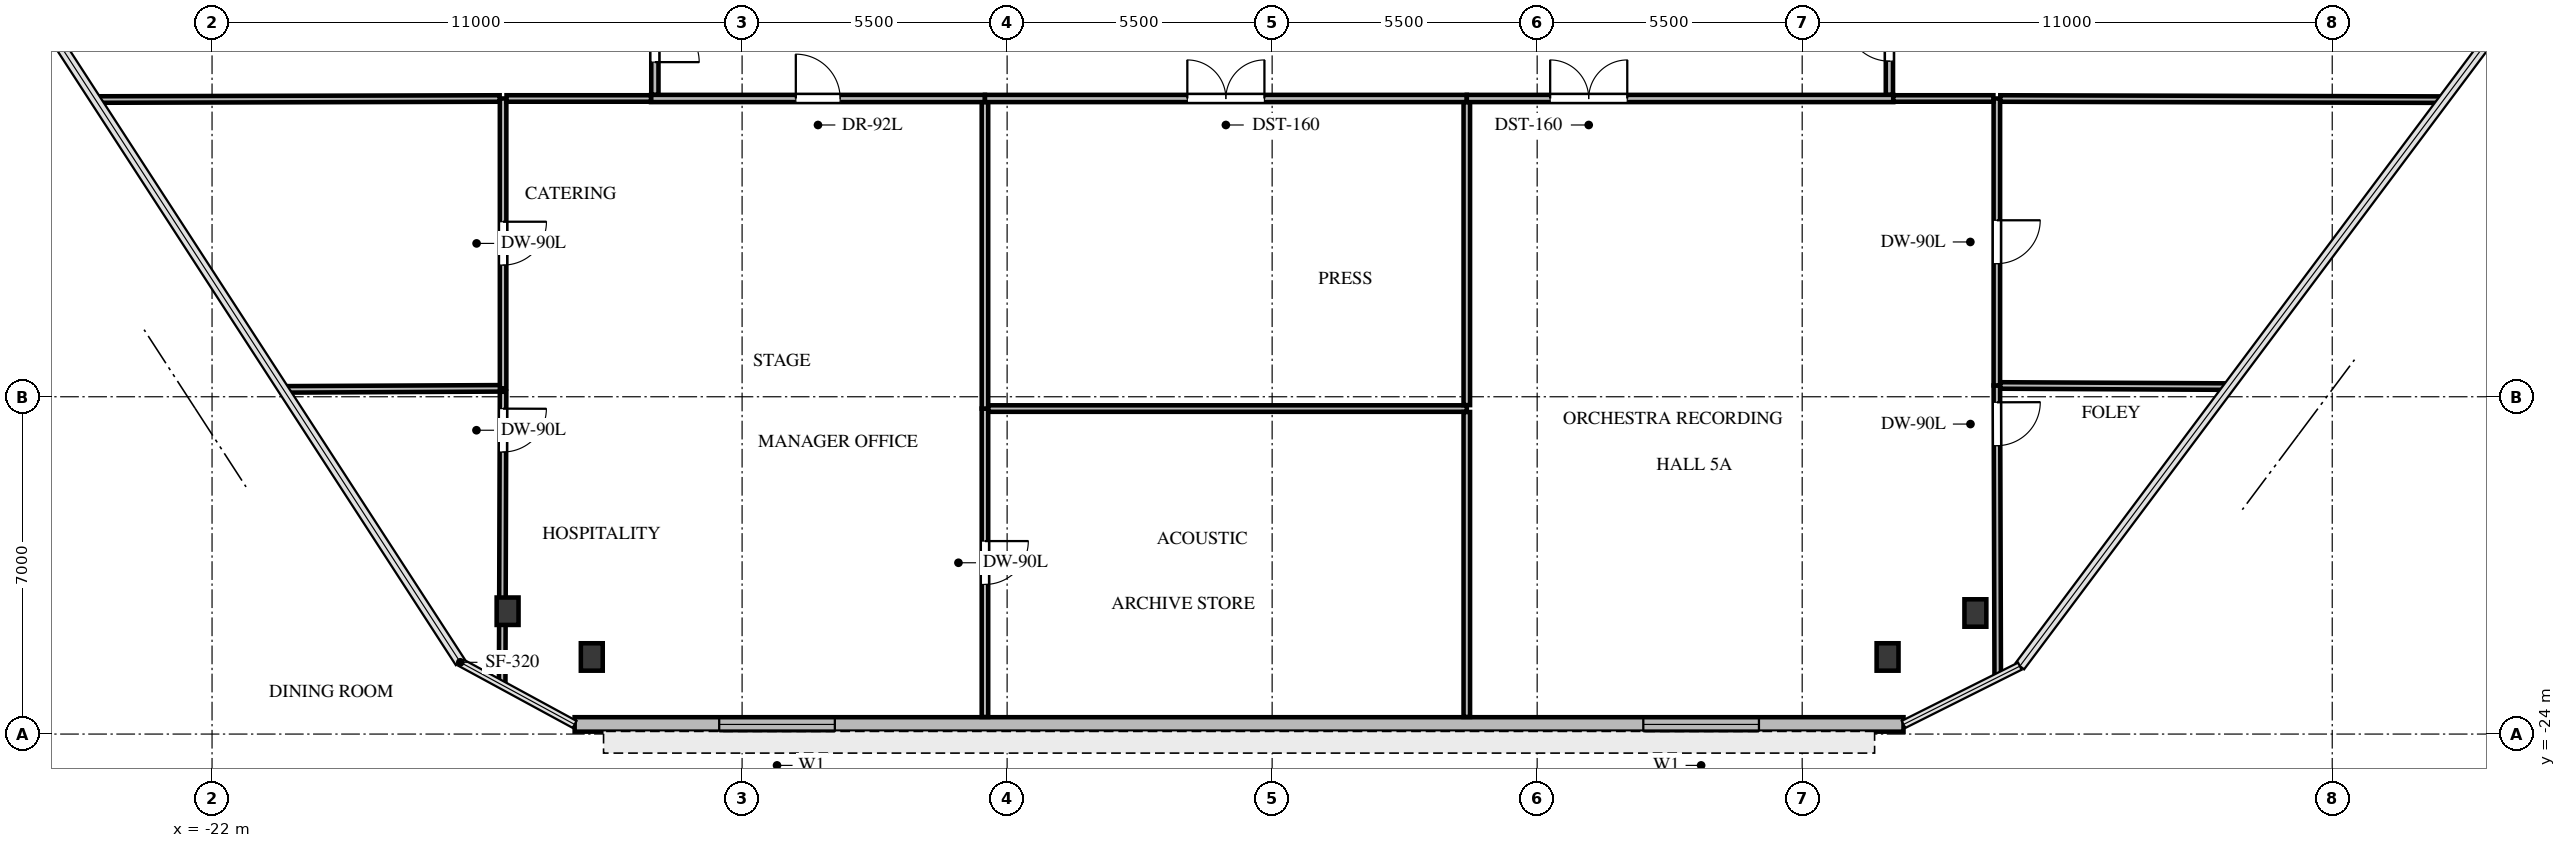
"""IFC4 building model, lengths in metres.
Left out: names, types, materials, properties, quantities, classifications, styles, units other than length and angle.
Written with IfcOpenShell. Run it as: python <this file> out.ifc"""

import sys

from ifc_helpers import new_model, si_unit, direction, frame, frame_2d, origin, origin_2d, place, context, subcontext, project, spatial, rectangle, i_section, extrude, source, transform, mapped, element, fill, save


model = new_model("IFC4")
c1 = context("Model", 3, precision=1e-05, world=origin(), true_north=direction((0.0, 1.0)))
c2 = subcontext(c1, "Body", "Model", "MODEL_VIEW")
j1 = project(units=[si_unit("LENGTHUNIT", "METRE"), si_unit("PLANEANGLEUNIT", "RADIAN")], contexts=[c1])
p1 = place(None, origin())
s1 = spatial("IfcSite", under=j1, at=p1, CompositionType="ELEMENT")
p2 = place(p1, origin())
s2 = spatial("IfcBuilding", under=s1, at=p2, CompositionType="ELEMENT")
p3 = place(p2, frame((0.0, 0.0, 26.8)))
s3 = spatial("IfcBuildingStorey", under=s2, at=p3, CompositionType="ELEMENT", Elevation=26.8)
m1 = source(origin(), c2, "Body", "SweptSolid", [
    extrude(i_section(OverallWidth=0.454, OverallDepth=0.569, WebThickness=0.078, FlangeThickness=0.125, FilletRadius=0.031, at=origin_2d()), origin(), (0.0, 0.0, 1.0), 5.68),
])
for number, where, z_axis, x_axis in (
    (1, (-15.866, -21.451, -0.32), (0.0, 0.0, 1.0), (1.0, 0.0, 0.0)),
    (2, (14.594, -21.488, -0.32), (0.0, 0.0, 1.0), (1.0, 0.0, 0.0)),
    (3, (12.772, -22.4, -0.32), (0.0, 0.0, 1.0), (1.0, 0.0, 0.0)),
    (4, (-14.119, -22.4, -0.32), (0.0, 0.0, 1.0), (1.0, 0.0, 0.0)),
):
    element("IfcColumn", number, at=place(p3, frame(where, z_axis=z_axis, x_axis=x_axis)), inside=s3, PredefinedType="COLUMN", context=c2, shape_type="MappedRepresentation", body=[
        mapped(m1, transform((0.0, 0.0, 0.0), x_axis=(1.0, 0.0, 0.0), y_axis=(0.0, 1.0, 0.0), z_axis=(0.0, 0.0, 1.0), scale=1.0)),
    ])
p4 = place(p3, frame((13.103, -23.8, 0.0), z_axis=(0.0, 0.0, 1.0), x_axis=(-1.0, 0.0, 0.0)))
e5 = element("IfcWall", 5, at=p4, inside=s3, PredefinedType="SOLIDWALL", context=c2, shape_type="SweptSolid", body=[
    extrude(rectangle(XDim=27.578, YDim=0.3, at=frame_2d((13.789, 0.0))), origin(), (0.0, 0.0, 1.0), 5.36),
])
p5 = place(p4, frame((3.0, 0.0, 1.0)))
e6 = element("IfcOpeningElement", 6, at=p5, cuts=e5, PredefinedType="OPENING", context=c2, shape_type="SweptSolid", body=[
    extrude(rectangle(XDim=2.4, YDim=2.1, at=frame_2d((1.2, 1.05))), frame((0.0, 0.16, 0.0), z_axis=(0.0, -1.0, 0.0), x_axis=(1.0, 0.0, 0.0)), (0.0, 0.0, 1.0), 0.32),
])
p6 = place(p4, frame((22.178, 0.0, 1.0)))
e7 = element("IfcOpeningElement", 7, at=p6, cuts=e5, PredefinedType="OPENING", context=c2, shape_type="SweptSolid", body=[
    extrude(rectangle(XDim=2.4, YDim=2.1, at=frame_2d((1.2, 1.05))), frame((0.0, 0.16, 0.0), z_axis=(0.0, -1.0, 0.0), x_axis=(1.0, 0.0, 0.0)), (0.0, 0.0, 1.0), 0.32),
])
p7 = place(p3, frame((-12.89, -10.81, 0.0), z_axis=(0.0, 0.0, 1.0), x_axis=(1.0, 0.0, 0.0)))
e8 = element("IfcWall", 8, at=p7, inside=s3, PredefinedType="PARTITIONING", context=c2, shape_type="SweptSolid", body=[
    extrude(rectangle(XDim=6.93, YDim=0.15, at=frame_2d((3.465, 0.0))), origin(), (0.0, 0.0, 1.0), 3.53),
])
p8 = place(p7, frame((3.005, 0.0, 0.0)))
e9 = element("IfcOpeningElement", 9, at=p8, cuts=e8, PredefinedType="OPENING", context=c2, shape_type="SweptSolid", body=[
    extrude(rectangle(XDim=0.92, YDim=2.1, at=frame_2d((0.46, 1.05))), frame((0.0, 0.085, 0.0), z_axis=(0.0, -1.0, 0.0), x_axis=(1.0, 0.0, 0.0)), (0.0, 0.0, 1.0), 0.17),
])
p9 = place(p3, frame((-5.96, -10.81, 0.0), z_axis=(0.0, 0.0, 1.0), x_axis=(1.0, 0.0, 0.0)))
e10 = element("IfcWall", 10, at=p9, inside=s3, PredefinedType="PARTITIONING", context=c2, shape_type="SweptSolid", body=[
    extrude(rectangle(XDim=10.0, YDim=0.15, at=frame_2d((5.0, 0.0))), origin(), (0.0, 0.0, 1.0), 3.53),
])
p10 = place(p9, frame((4.2, 0.0, 0.0)))
e11 = element("IfcOpeningElement", 11, at=p10, cuts=e10, PredefinedType="OPENING", context=c2, shape_type="SweptSolid", body=[
    extrude(rectangle(XDim=1.6, YDim=2.15, at=frame_2d((0.8, 1.075))), frame((0.0, 0.085, 0.0), z_axis=(0.0, -1.0, 0.0), x_axis=(1.0, 0.0, 0.0)), (0.0, 0.0, 1.0), 0.17),
])
p11 = place(p3, frame((4.04, -10.81, 0.0), z_axis=(0.0, 0.0, 1.0), x_axis=(1.0, 0.0, 0.0)))
e12 = element("IfcWall", 12, at=p11, inside=s3, PredefinedType="PARTITIONING", context=c2, shape_type="SweptSolid", body=[
    extrude(rectangle(XDim=8.85, YDim=0.15, at=frame_2d((4.425, 0.0))), origin(), (0.0, 0.0, 1.0), 3.53),
])
p12 = place(p11, frame((1.73, 0.0, 0.0)))
e13 = element("IfcOpeningElement", 13, at=p12, cuts=e12, PredefinedType="OPENING", context=c2, shape_type="SweptSolid", body=[
    extrude(rectangle(XDim=1.6, YDim=2.15, at=frame_2d((0.8, 1.075))), frame((0.0, 0.085, 0.0), z_axis=(0.0, -1.0, 0.0), x_axis=(1.0, 0.0, 0.0)), (0.0, 0.0, 1.0), 0.17),
])
p13 = place(p3, frame((-12.81, -8.46, 0.0), z_axis=(0.0, 0.0, 1.0), x_axis=(0.0, -1.0, 0.0)))
e14 = element("IfcWall", 14, at=p13, inside=s3, PredefinedType="PARTITIONING", context=c2, shape_type="SweptSolid", body=[
    extrude(rectangle(XDim=2.271, YDim=0.15, at=frame_2d((1.135, 0.0))), origin(), (0.0, 0.0, 1.0), 5.345),
])
p14 = place(p13, frame((0.676, 0.0, 0.0)))
e15 = element("IfcOpeningElement", 15, at=p14, cuts=e14, PredefinedType="OPENING", context=c2, shape_type="SweptSolid", body=[
    extrude(rectangle(XDim=0.92, YDim=2.1, at=frame_2d((0.46, 1.05))), frame((0.0, 0.085, 0.0), z_axis=(0.0, -1.0, 0.0), x_axis=(1.0, 0.0, 0.0)), (0.0, 0.0, 1.0), 0.17),
])
p15 = place(p3, frame((12.81, -10.731, 0.0), z_axis=(0.0, 0.0, 1.0), x_axis=(0.0, 1.0, 0.0)))
e16 = element("IfcWall", 16, at=p15, inside=s3, PredefinedType="PARTITIONING", context=c2, shape_type="SweptSolid", body=[
    extrude(rectangle(XDim=2.291, YDim=0.15, at=frame_2d((1.146, 0.0))), origin(), (0.0, 0.0, 1.0), 5.345),
])
p16 = place(p15, frame((0.696, 0.0, 0.0)))
e17 = element("IfcOpeningElement", 17, at=p16, cuts=e16, PredefinedType="OPENING", context=c2, shape_type="SweptSolid", body=[
    extrude(rectangle(XDim=0.9, YDim=2.05, at=frame_2d((0.45, 1.025))), frame((0.0, 0.085, 0.0), z_axis=(0.0, -1.0, 0.0), x_axis=(1.0, 0.0, 0.0)), (0.0, 0.0, 1.0), 0.17),
])
p17 = place(p3, frame((-20.521, -16.847, 0.0), z_axis=(0.0, 0.0, 1.0), x_axis=(0.999988651398, 0.004764144852, 0.0)))
e18 = element("IfcWall", 18, at=p17, inside=s3, PredefinedType="PARTITIONING", context=c2, shape_type="SweptSolid", body=[
    extrude(rectangle(XDim=4.561, YDim=0.135, at=frame_2d((2.28, 0.0))), origin(), (0.0, 0.0, 1.0), 3.53),
])
p18 = place(p3, frame((-15.96, -16.896, 0.0), z_axis=(0.0, 0.0, 1.0), x_axis=(-0.003088633483, -0.99999523016, 0.0)))
e19 = element("IfcWall", 19, at=p18, inside=s3, PredefinedType="PARTITIONING", context=c2, shape_type="SweptSolid", body=[
    extrude(rectangle(XDim=6.086, YDim=0.135, at=frame_2d((3.043, 0.0))), origin(), (0.0, 0.0, 1.0), 3.53),
])
p19 = place(p18, frame((0.35, 0.0, 0.0)))
e20 = element("IfcOpeningElement", 20, at=p19, cuts=e19, PredefinedType="OPENING", context=c2, shape_type="SweptSolid", body=[
    extrude(rectangle(XDim=0.9, YDim=2.05, at=frame_2d((0.45, 1.025))), frame((0.0, 0.078, 0.0), z_axis=(0.0, -1.0, 0.0), x_axis=(1.0, 0.0, 0.0)), (0.0, 0.0, 1.0), 0.155),
])
p20 = place(p3, frame((-15.96, -10.81, 0.0), z_axis=(0.0, 0.0, 1.0), x_axis=(0.0, -1.0, 0.0)))
e21 = element("IfcWall", 21, at=p20, inside=s3, PredefinedType="PARTITIONING", context=c2, shape_type="SweptSolid", body=[
    extrude(rectangle(XDim=6.015, YDim=0.135, at=frame_2d((3.007, 0.0))), origin(), (0.0, 0.0, 1.0), 5.345),
])
p21 = place(p20, frame((2.558, 0.0, 0.0)))
e22 = element("IfcOpeningElement", 22, at=p21, cuts=e21, PredefinedType="OPENING", context=c2, shape_type="SweptSolid", body=[
    extrude(rectangle(XDim=0.9, YDim=2.05, at=frame_2d((0.45, 1.025))), frame((0.0, 0.078, 0.0), z_axis=(0.0, -1.0, 0.0), x_axis=(1.0, 0.0, 0.0)), (0.0, 0.0, 1.0), 0.155),
])
p22 = place(p3, frame((-24.422, -10.832, 0.0), z_axis=(0.0, 0.0, 1.0), x_axis=(0.9999967215, 0.002560662035, 0.0)))
e23 = element("IfcWall", 23, at=p22, inside=s3, PredefinedType="PARTITIONING", context=c2, shape_type="SweptSolid", body=[
    extrude(rectangle(XDim=8.39, YDim=0.135, at=frame_2d((4.195, 0.0))), origin(), (0.0, 0.0, 1.0), 3.53),
])
p23 = place(p3, frame((-5.96, -17.245, 0.0), z_axis=(0.0, 0.0, 1.0), x_axis=(0.0, -1.0, 0.0)))
e24 = element("IfcWall", 24, at=p23, inside=s3, PredefinedType="PARTITIONING", context=c2, shape_type="SweptSolid", body=[
    extrude(rectangle(XDim=6.4, YDim=0.135, at=frame_2d((3.2, 0.0))), origin(), (0.0, 0.0, 1.0), 3.53),
])
p24 = place(p23, frame((2.75, 0.0, 0.0)))
e25 = element("IfcOpeningElement", 25, at=p24, cuts=e24, PredefinedType="OPENING", context=c2, shape_type="SweptSolid", body=[
    extrude(rectangle(XDim=0.9, YDim=2.05, at=frame_2d((0.45, 1.025))), frame((0.0, 0.078, 0.0), z_axis=(0.0, -1.0, 0.0), x_axis=(1.0, 0.0, 0.0)), (0.0, 0.0, 1.0), 0.155),
])
p25 = place(p3, frame((-5.96, -10.889, 0.0), z_axis=(0.0, 0.0, 1.0), x_axis=(0.0, -1.0, 0.0)))
e26 = element("IfcWall", 26, at=p25, inside=s3, PredefinedType="PARTITIONING", context=c2, shape_type="SweptSolid", body=[
    extrude(rectangle(XDim=6.356, YDim=0.135, at=frame_2d((3.178, 0.0))), origin(), (0.0, 0.0, 1.0), 3.53),
])
p26 = place(p3, frame((-15.888, -10.81, 0.0), z_axis=(0.0, 0.0, 1.0), x_axis=(1.0, 0.0, 0.0)))
e27 = element("IfcWall", 27, at=p26, inside=s3, PredefinedType="PARTITIONING", context=c2, shape_type="SweptSolid", body=[
    extrude(rectangle(XDim=2.999, YDim=0.135, at=frame_2d((1.499, 0.0))), origin(), (0.0, 0.0, 1.0), 5.345),
])
p27 = place(p3, frame((-5.888, -17.245, 0.0), z_axis=(0.0, 0.0, 1.0), x_axis=(1.0, 0.0, 0.0)))
e28 = element("IfcWall", 28, at=p27, inside=s3, PredefinedType="PARTITIONING", context=c2, shape_type="SweptSolid", body=[
    extrude(rectangle(XDim=9.928, YDim=0.135, at=frame_2d((4.964, 0.0))), origin(), (0.0, 0.0, 1.0), 4.693),
])
p28 = place(p3, frame((4.04, -17.316, 0.0), z_axis=(0.0, 0.0, 1.0), x_axis=(0.0, -1.0, 0.0)))
e29 = element("IfcWall", 29, at=p28, inside=s3, PredefinedType="PARTITIONING", context=c2, shape_type="SweptSolid", body=[
    extrude(rectangle(XDim=6.329, YDim=0.135, at=frame_2d((3.164, 0.0))), origin(), (0.0, 0.0, 1.0), 3.53),
])
p29 = place(p3, frame((4.04, -10.889, 0.0), z_axis=(0.0, 0.0, 1.0), x_axis=(0.0, -1.0, 0.0)))
e30 = element("IfcWall", 30, at=p29, inside=s3, PredefinedType="PARTITIONING", context=c2, shape_type="SweptSolid", body=[
    extrude(rectangle(XDim=6.285, YDim=0.135, at=frame_2d((3.142, 0.0))), origin(), (0.0, 0.0, 1.0), 5.345),
])
p30 = place(p3, frame((15.04, -16.765, 0.0), z_axis=(0.0, 0.0, 1.0), x_axis=(0.00294270504, -0.999995670234, 0.0)))
e31 = element("IfcWall", 31, at=p30, inside=s3, PredefinedType="PARTITIONING", context=c2, shape_type="SweptSolid", body=[
    extrude(rectangle(XDim=6.056, YDim=0.135, at=frame_2d((3.028, 0.0))), origin(), (0.0, 0.0, 1.0), 3.53),
])
p31 = place(p30, frame((0.35, 0.0, 0.0)))
e32 = element("IfcOpeningElement", 32, at=p31, cuts=e31, PredefinedType="OPENING", context=c2, shape_type="SweptSolid", body=[
    extrude(rectangle(XDim=0.9, YDim=2.05, at=frame_2d((0.45, 1.025))), frame((0.0, 0.078, 0.0), z_axis=(0.0, -1.0, 0.0), x_axis=(1.0, 0.0, 0.0)), (0.0, 0.0, 1.0), 0.155),
])
p32 = place(p3, frame((15.04, -10.81, 0.0), z_axis=(0.0, 0.0, 1.0), x_axis=(0.0, -1.0, 0.0)))
e33 = element("IfcWall", 33, at=p32, inside=s3, PredefinedType="PARTITIONING", context=c2, shape_type="SweptSolid", body=[
    extrude(rectangle(XDim=5.955, YDim=0.135, at=frame_2d((2.978, 0.0))), origin(), (0.0, 0.0, 1.0), 5.345),
])
p33 = place(p32, frame((2.528, 0.0, 0.0)))
e34 = element("IfcOpeningElement", 34, at=p33, cuts=e33, PredefinedType="OPENING", context=c2, shape_type="SweptSolid", body=[
    extrude(rectangle(XDim=0.9, YDim=2.05, at=frame_2d((0.45, 1.025))), frame((0.0, 0.078, 0.0), z_axis=(0.0, -1.0, 0.0), x_axis=(1.0, 0.0, 0.0)), (0.0, 0.0, 1.0), 0.155),
])
p34 = place(p3, frame((12.89, -10.81, 0.0), z_axis=(0.0, 0.0, 1.0), x_axis=(1.0, 0.0, 0.0)))
e35 = element("IfcWall", 35, at=p34, inside=s3, PredefinedType="PARTITIONING", context=c2, shape_type="SweptSolid", body=[
    extrude(rectangle(XDim=2.079, YDim=0.135, at=frame_2d((1.039, 0.0))), origin(), (0.0, 0.0, 1.0), 5.345),
])
p35 = place(p3, frame((15.112, -16.766, 0.0), z_axis=(0.0, 0.0, 1.0), x_axis=(0.999987815736, -0.004936433913, 0.0)))
e36 = element("IfcWall", 36, at=p35, inside=s3, PredefinedType="PARTITIONING", context=c2, shape_type="SweptSolid", body=[
    extrude(rectangle(XDim=4.748, YDim=0.135, at=frame_2d((2.374, 0.0))), origin(), (0.0, 0.0, 1.0), 3.53),
])
p36 = place(p3, frame((15.112, -10.81, 0.0), z_axis=(0.0, 0.0, 1.0), x_axis=(0.999996689995, -0.002572935781, 0.0)))
e37 = element("IfcWall", 37, at=p36, inside=s3, PredefinedType="PARTITIONING", context=c2, shape_type="SweptSolid", body=[
    extrude(rectangle(XDim=9.204, YDim=0.135, at=frame_2d((4.602, 0.0))), origin(), (0.0, 0.0, 1.0), 3.53),
])
m2 = source(origin(), c2, "Body", "SweptSolid", [
    extrude(rectangle(XDim=2.4, YDim=2.1, at=frame_2d((1.2, 1.05))), frame((0.0, 0.03, 0.0), z_axis=(0.0, -1.0, 0.0), x_axis=(1.0, 0.0, 0.0)), (0.0, 0.0, 1.0), 0.06),
])
p37 = place(p5, origin())
e38 = element("IfcWindow", 38, at=p37, inside=s3, PartitioningType="SINGLE_PANEL", PredefinedType="WINDOW", context=c2, shape_type="MappedRepresentation", body=[
    mapped(m2, transform((0.0, 0.0, 0.0), x_axis=(1.0, 0.0, 0.0), y_axis=(0.0, 1.0, 0.0), z_axis=(0.0, 0.0, 1.0), scale=1.0)),
])
fill(e6, e38)
p38 = place(p6, origin())
e39 = element("IfcWindow", 39, at=p38, inside=s3, PartitioningType="SINGLE_PANEL", PredefinedType="WINDOW", context=c2, shape_type="MappedRepresentation", body=[
    mapped(m2, transform((0.0, 0.0, 0.0), x_axis=(1.0, 0.0, 0.0), y_axis=(0.0, 1.0, 0.0), z_axis=(0.0, 0.0, 1.0), scale=1.0)),
])
fill(e7, e39)
m3 = source(origin(), c2, "Body", "SweptSolid", [
    extrude(rectangle(XDim=0.92, YDim=2.1, at=frame_2d((0.46, 1.05))), frame((0.0, 0.025, 0.0), z_axis=(0.0, -1.0, 0.0), x_axis=(1.0, 0.0, 0.0)), (0.0, 0.0, 1.0), 0.05),
])
p39 = place(p8, origin())
e40 = element("IfcDoor", 40, at=p39, inside=s3, OperationType="SINGLE_SWING_LEFT", PredefinedType="DOOR", context=c2, shape_type="MappedRepresentation", body=[
    mapped(m3, transform((0.0, 0.0, 0.0), x_axis=(1.0, 0.0, 0.0), y_axis=(0.0, 1.0, 0.0), z_axis=(0.0, 0.0, 1.0), scale=1.0)),
])
fill(e9, e40)
m4 = source(origin(), c2, "Body", "SweptSolid", [
    extrude(rectangle(XDim=1.6, YDim=2.15, at=frame_2d((0.8, 1.075))), frame((0.0, 0.025, 0.0), z_axis=(0.0, -1.0, 0.0), x_axis=(1.0, 0.0, 0.0)), (0.0, 0.0, 1.0), 0.05),
])
p40 = place(p10, origin())
e41 = element("IfcDoor", 41, at=p40, inside=s3, OperationType="DOUBLE_DOOR_SINGLE_SWING", PredefinedType="DOOR", context=c2, shape_type="MappedRepresentation", body=[
    mapped(m4, transform((0.0, 0.0, 0.0), x_axis=(1.0, 0.0, 0.0), y_axis=(0.0, 1.0, 0.0), z_axis=(0.0, 0.0, 1.0), scale=1.0)),
])
fill(e11, e41)
p41 = place(p12, origin())
e42 = element("IfcDoor", 42, at=p41, inside=s3, OperationType="DOUBLE_DOOR_SINGLE_SWING", PredefinedType="DOOR", context=c2, shape_type="MappedRepresentation", body=[
    mapped(m4, transform((0.0, 0.0, 0.0), x_axis=(1.0, 0.0, 0.0), y_axis=(0.0, 1.0, 0.0), z_axis=(0.0, 0.0, 1.0), scale=1.0)),
])
fill(e13, e42)
m5 = source(origin(), c2, "Body", "SweptSolid", [
    extrude(rectangle(XDim=0.92, YDim=2.1, at=frame_2d((0.46, 1.05))), frame((0.0, 0.025, 0.0), z_axis=(0.0, -1.0, 0.0), x_axis=(1.0, 0.0, 0.0)), (0.0, 0.0, 1.0), 0.05),
])
p42 = place(p14, origin())
e43 = element("IfcDoor", 43, at=p42, inside=s3, OperationType="SINGLE_SWING_RIGHT", PredefinedType="DOOR", context=c2, shape_type="MappedRepresentation", body=[
    mapped(m5, transform((0.0, 0.0, 0.0), x_axis=(1.0, 0.0, 0.0), y_axis=(0.0, 1.0, 0.0), z_axis=(0.0, 0.0, 1.0), scale=1.0)),
])
fill(e15, e43)
m6 = source(origin(), c2, "Body", "SweptSolid", [
    extrude(rectangle(XDim=0.9, YDim=2.05, at=frame_2d((0.45, 1.025))), frame((0.0, 0.025, 0.0), z_axis=(0.0, -1.0, 0.0), x_axis=(1.0, 0.0, 0.0)), (0.0, 0.0, 1.0), 0.05),
])
p43 = place(p16, origin())
e44 = element("IfcDoor", 44, at=p43, inside=s3, OperationType="SINGLE_SWING_RIGHT", PredefinedType="DOOR", context=c2, shape_type="MappedRepresentation", body=[
    mapped(m6, transform((0.0, 0.0, 0.0), x_axis=(1.0, 0.0, 0.0), y_axis=(0.0, 1.0, 0.0), z_axis=(0.0, 0.0, 1.0), scale=1.0)),
])
fill(e17, e44)
m7 = source(origin(), c2, "Body", "SweptSolid", [
    extrude(rectangle(XDim=0.9, YDim=2.05, at=frame_2d((0.45, 1.025))), frame((0.0, 0.025, 0.0), z_axis=(0.0, -1.0, 0.0), x_axis=(1.0, 0.0, 0.0)), (0.0, 0.0, 1.0), 0.05),
])
p44 = place(p19, origin())
e45 = element("IfcDoor", 45, at=p44, inside=s3, OperationType="SINGLE_SWING_LEFT", PredefinedType="DOOR", context=c2, shape_type="MappedRepresentation", body=[
    mapped(m7, transform((0.0, 0.0, 0.0), x_axis=(1.0, 0.0, 0.0), y_axis=(0.0, 1.0, 0.0), z_axis=(0.0, 0.0, 1.0), scale=1.0)),
])
fill(e20, e45)
p45 = place(p21, origin())
e46 = element("IfcDoor", 46, at=p45, inside=s3, OperationType="SINGLE_SWING_LEFT", PredefinedType="DOOR", context=c2, shape_type="MappedRepresentation", body=[
    mapped(m7, transform((0.0, 0.0, 0.0), x_axis=(1.0, 0.0, 0.0), y_axis=(0.0, 1.0, 0.0), z_axis=(0.0, 0.0, 1.0), scale=1.0)),
])
fill(e22, e46)
p46 = place(p24, origin())
e47 = element("IfcDoor", 47, at=p46, inside=s3, OperationType="SINGLE_SWING_LEFT", PredefinedType="DOOR", context=c2, shape_type="MappedRepresentation", body=[
    mapped(m7, transform((0.0, 0.0, 0.0), x_axis=(1.0, 0.0, 0.0), y_axis=(0.0, 1.0, 0.0), z_axis=(0.0, 0.0, 1.0), scale=1.0)),
])
fill(e25, e47)
p47 = place(p31, origin())
e48 = element("IfcDoor", 48, at=p47, inside=s3, OperationType="SINGLE_SWING_LEFT", PredefinedType="DOOR", context=c2, shape_type="MappedRepresentation", body=[
    mapped(m7, transform((0.0, 0.0, 0.0), x_axis=(1.0, 0.0, 0.0), y_axis=(0.0, 1.0, 0.0), z_axis=(0.0, 0.0, 1.0), scale=1.0)),
])
fill(e32, e48)
p48 = place(p33, origin())
e49 = element("IfcDoor", 49, at=p48, inside=s3, OperationType="SINGLE_SWING_LEFT", PredefinedType="DOOR", context=c2, shape_type="MappedRepresentation", body=[
    mapped(m7, transform((0.0, 0.0, 0.0), x_axis=(1.0, 0.0, 0.0), y_axis=(0.0, 1.0, 0.0), z_axis=(0.0, 0.0, 1.0), scale=1.0)),
])
fill(e34, e49)
save(model, sys.argv[1])
